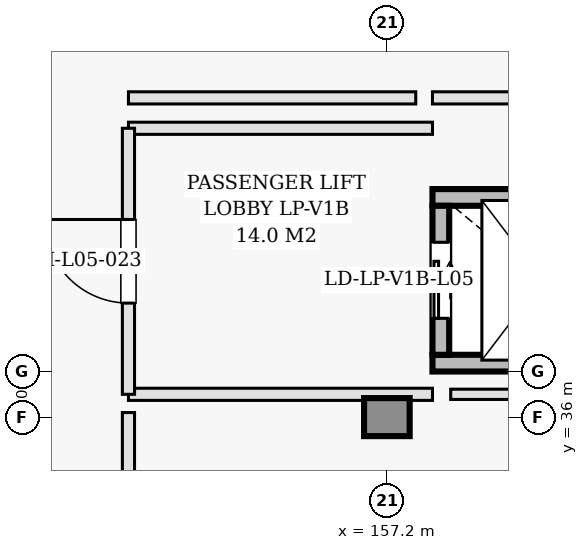
"""IFC4 building model, lengths in metres.
Left out: names, types, materials, properties, quantities, classifications, styles, units other than length and angle.
Written with IfcOpenShell. Run it as: python <this file> out.ifc"""

import sys

from ifc_helpers import new_model, si_unit, direction, frame, frame_2d, origin, origin_2d, place, context, subcontext, project, spatial, rectangle, extrude, element, fill, save


model = new_model("IFC4")
c1 = context("Model", 3, precision=1e-05, world=origin(), true_north=direction((0.0, 1.0)))
c2 = subcontext(c1, "Body", "Model", "MODEL_VIEW")
j1 = project(units=[si_unit("LENGTHUNIT", "METRE"), si_unit("PLANEANGLEUNIT", "RADIAN")], contexts=[c1])
p1 = place(None, origin())
s1 = spatial("IfcSite", under=j1, at=p1, CompositionType="ELEMENT")
p2 = place(p1, origin())
s2 = spatial("IfcBuilding", under=s1, at=p2, CompositionType="ELEMENT")
p3 = place(p2, frame((0.0, 0.0, 22.2)))
s3 = spatial("IfcBuildingStorey", under=s2, at=p3, CompositionType="ELEMENT", Elevation=22.2)
p4 = place(p3, frame((157.2, 36.0, 0.0), z_axis=(0.0, 0.0, 1.0), x_axis=(1.0, 0.0, 0.0)))
e1 = element("IfcColumn", 1, at=p4, inside=s3, PredefinedType="COLUMN", context=c2, shape_type="SweptSolid", body=[
    extrude(rectangle(XDim=0.5, YDim=0.5, at=origin_2d()), origin(), (0.0, 0.0, 1.0), 4.2),
])
for number, where, z_axis, x_axis in (
    (2, (157.8, 36.71, 0.0), (0.0, 0.0, 1.0), (1.0, 0.0, 0.0)),
    (3, (157.8, 38.89, 0.0), (0.0, 0.0, 1.0), (1.0, 0.0, 0.0)),
):
    element("IfcWall", number, at=place(p3, frame(where, z_axis=z_axis, x_axis=x_axis)), inside=s3, PredefinedType="SHEAR", context=c2, shape_type="SweptSolid", body=[
        extrude(rectangle(XDim=2.9, YDim=0.22, at=frame_2d((1.45, 0.0))), origin(), (0.0, 0.0, 1.0), 3.98),
    ])
p5 = place(p3, frame((157.91, 36.82, 0.0), z_axis=(0.0, 0.0, 1.0), x_axis=(0.0, 1.0, 0.0)))
e4 = element("IfcWall", 4, at=p5, inside=s3, PredefinedType="SHEAR", context=c2, shape_type="SweptSolid", body=[
    extrude(rectangle(XDim=1.96, YDim=0.22, at=frame_2d((0.98, 0.0))), origin(), (0.0, 0.0, 1.0), 3.98),
])
p6 = place(p5, frame((0.48, 0.0, 0.0)))
e5 = element("IfcOpeningElement", 5, at=p6, cuts=e4, PredefinedType="OPENING", context=c2, shape_type="SweptSolid", body=[
    extrude(rectangle(XDim=1.0, YDim=2.15, at=frame_2d((0.5, 1.075))), frame((0.0, 0.12, 0.0), z_axis=(0.0, -1.0, 0.0), x_axis=(1.0, 0.0, 0.0)), (0.0, 0.0, 1.0), 0.24),
])
p7 = place(p3, frame((153.8, 36.3, 0.0), z_axis=(0.0, 0.0, 1.0), x_axis=(1.0, 0.0, 0.0)))
e6 = element("IfcWall", 6, at=p7, inside=s3, PredefinedType="PARTITIONING", context=c2, shape_type="SweptSolid", body=[
    extrude(rectangle(XDim=4.0, YDim=0.16, at=frame_2d((2.0, 0.0))), origin(), (0.0, 0.0, 1.0), 3.165),
])
p8 = place(p3, frame((153.8, 39.8, 0.0), z_axis=(0.0, 0.0, 1.0), x_axis=(1.0, 0.0, 0.0)))
e7 = element("IfcWall", 7, at=p8, inside=s3, PredefinedType="PARTITIONING", context=c2, shape_type="SweptSolid", body=[
    extrude(rectangle(XDim=4.0, YDim=0.16, at=frame_2d((2.0, 0.0))), origin(), (0.0, 0.0, 1.0), 3.315),
])
p9 = place(p3, frame((153.8, 36.3, 0.0), z_axis=(0.0, 0.0, 1.0), x_axis=(0.0, 1.0, 0.0)))
e8 = element("IfcWall", 8, at=p9, inside=s3, PredefinedType="PARTITIONING", context=c2, shape_type="SweptSolid", body=[
    extrude(rectangle(XDim=3.5, YDim=0.16, at=frame_2d((1.75, 0.0))), origin(), (0.0, 0.0, 1.0), 3.525),
])
p10 = place(p9, frame((1.2, 0.0, 0.0)))
e9 = element("IfcOpeningElement", 9, at=p10, cuts=e8, PredefinedType="OPENING", context=c2, shape_type="SweptSolid", body=[
    extrude(rectangle(XDim=1.1, YDim=2.15, at=frame_2d((0.55, 1.075))), frame((0.0, 0.09, 0.0), z_axis=(0.0, -1.0, 0.0), x_axis=(1.0, 0.0, 0.0)), (0.0, 0.0, 1.0), 0.18),
])
p11 = place(p3, frame((153.8, 24.85, 0.0), z_axis=(0.0, 0.0, 1.0), x_axis=(0.0, 1.0, 0.0)))
e10 = element("IfcWall", 10, at=p11, inside=s3, PredefinedType="PARTITIONING", context=c2, shape_type="SweptSolid", body=[
    extrude(rectangle(XDim=11.21, YDim=0.16, at=frame_2d((5.605, 0.0))), origin(), (0.0, 0.0, 1.0), 3.165),
])
p12 = place(p11, frame((4.705, 0.0, 0.0)))
e11 = element("IfcOpeningElement", 11, at=p12, cuts=e10, PredefinedType="OPENING", context=c2, shape_type="SweptSolid", body=[
    extrude(rectangle(XDim=1.8, YDim=2.2, at=frame_2d((0.9, 1.1))), frame((0.0, 0.09, 0.0), z_axis=(0.0, -1.0, 0.0), x_axis=(1.0, 0.0, 0.0)), (0.0, 0.0, 1.0), 0.18),
])
p13 = place(p3, frame((158.04, 36.3, 0.0), z_axis=(0.0, 0.0, 1.0), x_axis=(1.0, 0.0, 0.0)))
e12 = element("IfcWall", 12, at=p13, inside=s3, PredefinedType="PARTITIONING", context=c2, shape_type="SweptSolid", body=[
    extrude(rectangle(XDim=16.509, YDim=0.135, at=frame_2d((8.254, 0.0))), origin(), (0.0, 0.0, 1.0), 3.165),
])
p14 = place(p3, frame((157.8, 40.2, 0.0), z_axis=(0.0, 0.0, 1.0), x_axis=(1.0, 0.0, 0.0)))
e13 = element("IfcWall", 13, at=p14, inside=s3, PredefinedType="PARTITIONING", context=c2, shape_type="SweptSolid", body=[
    extrude(rectangle(XDim=2.58, YDim=0.16, at=frame_2d((1.29, 0.0))), origin(), (0.0, 0.0, 1.0), 3.98),
])
p15 = place(p3, frame((153.8, 40.2, 0.0), z_axis=(0.0, 0.0, 1.0), x_axis=(1.0, 0.0, 0.0)))
e14 = element("IfcWall", 14, at=p15, inside=s3, PredefinedType="PARTITIONING", context=c2, shape_type="SweptSolid", body=[
    extrude(rectangle(XDim=3.78, YDim=0.16, at=frame_2d((1.89, 0.0))), origin(), (0.0, 0.0, 1.0), 3.315),
])
p16 = place(p6, origin())
e15 = element("IfcDoor", 15, at=p16, inside=s3, OperationType="SLIDING_TO_LEFT", PredefinedType="DOOR", context=c2, shape_type="SweptSolid", body=[
    extrude(rectangle(XDim=1.0, YDim=2.15, at=frame_2d((0.5, 1.075))), frame((0.0, 0.025, 0.0), z_axis=(0.0, -1.0, 0.0), x_axis=(1.0, 0.0, 0.0)), (0.0, 0.0, 1.0), 0.05),
])
fill(e5, e15)
p17 = place(p10, origin())
e16 = element("IfcDoor", 16, at=p17, inside=s3, OperationType="SINGLE_SWING_RIGHT", PredefinedType="DOOR", context=c2, shape_type="SweptSolid", body=[
    extrude(rectangle(XDim=1.1, YDim=2.15, at=frame_2d((0.55, 1.075))), frame((0.0, 0.025, 0.0), z_axis=(0.0, -1.0, 0.0), x_axis=(1.0, 0.0, 0.0)), (0.0, 0.0, 1.0), 0.05),
])
fill(e9, e16)
save(model, sys.argv[1])
